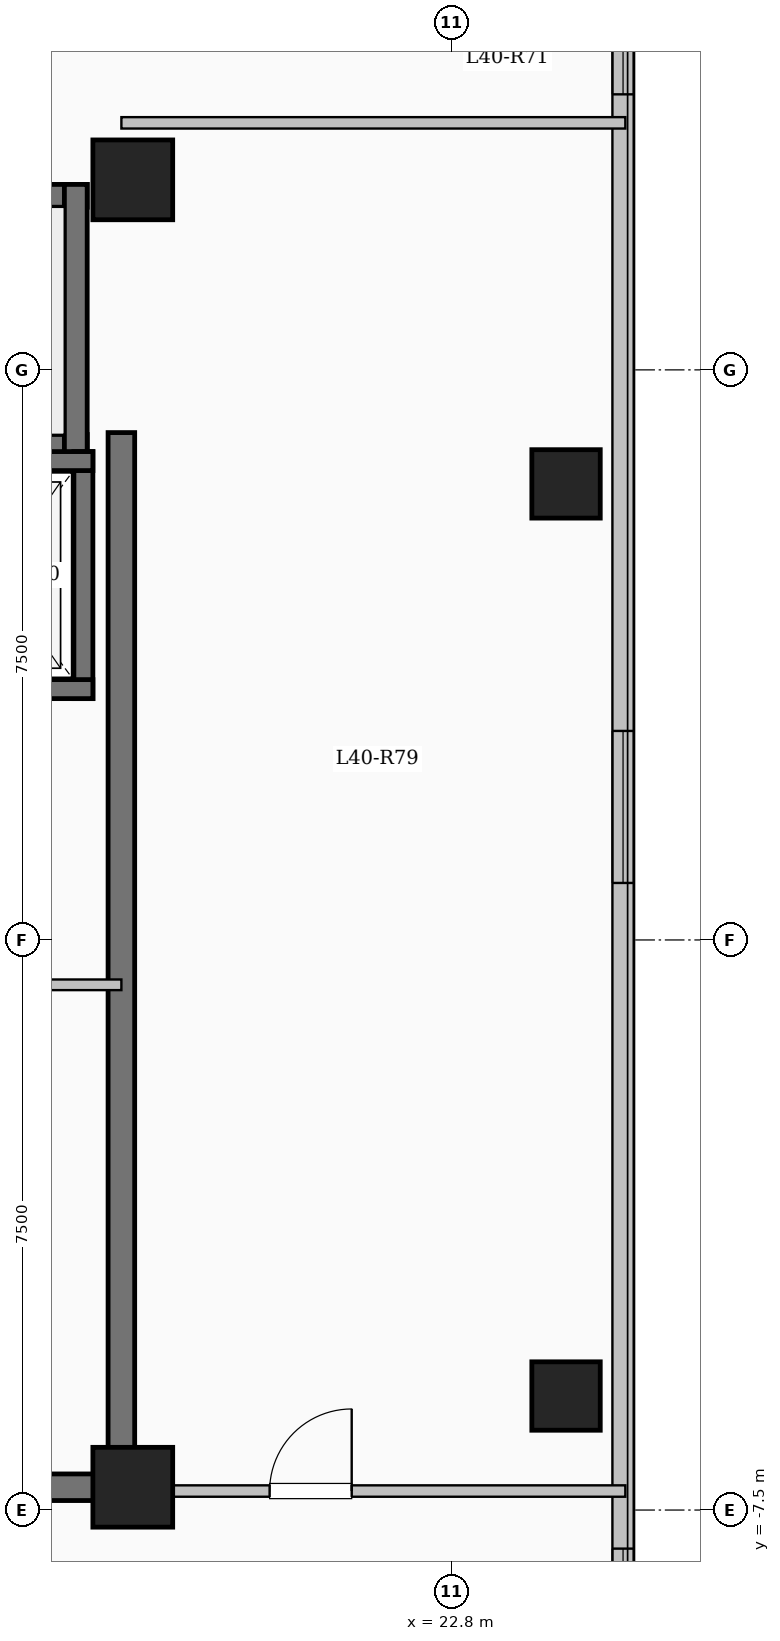
"""IFC4 building model, lengths in metres.
Left out: names, types, materials, properties, quantities, classifications, styles, units other than length and angle.
Written with IfcOpenShell. Run it as: python <this file> out.ifc"""

import sys

from ifc_helpers import new_model, si_unit, direction, frame, frame_2d, origin, origin_2d, place, context, subcontext, project, spatial, rectangle, extrude, element, fill, save


model = new_model("IFC4")
c1 = context("Model", 3, precision=1e-05, world=origin(), true_north=direction((0.0, 1.0)))
c2 = subcontext(c1, "Body", "Model", "MODEL_VIEW")
j1 = project(units=[si_unit("LENGTHUNIT", "METRE"), si_unit("PLANEANGLEUNIT", "RADIAN")], contexts=[c1])
p1 = place(None, origin())
s1 = spatial("IfcSite", under=j1, at=p1, CompositionType="ELEMENT")
p2 = place(p1, origin())
s2 = spatial("IfcBuilding", under=s1, at=p2, CompositionType="ELEMENT")
p3 = place(p2, frame((0.0, 0.0, 149.35)))
s3 = spatial("IfcBuildingStorey", under=s2, at=p3, CompositionType="ELEMENT", Elevation=149.35)
for number, where, z_axis, x_axis in (
    (1, (18.6, -7.2, 0.0), (0.0, 0.0, 1.0), (1.0, 0.0, 0.0)),
    (2, (18.6, 10.0, 0.0), (0.0, 0.0, 1.0), (1.0, 0.0, 0.0)),
):
    element("IfcColumn", number, at=place(p3, frame(where, z_axis=z_axis, x_axis=x_axis)), inside=s3, PredefinedType="COLUMN", context=c2, shape_type="SweptSolid", body=[
        extrude(rectangle(XDim=1.05, YDim=1.05, at=origin_2d()), origin(), (0.0, 0.0, 1.0), 3.35),
    ])
for number, where, z_axis, x_axis in (
    (3, (24.3, -6.0, 0.0), (0.0, 0.0, 1.0), (1.0, 0.0, 0.0)),
    (4, (24.3, 6.0, 0.0), (0.0, 0.0, 1.0), (1.0, 0.0, 0.0)),
):
    element("IfcColumn", number, at=place(p3, frame(where, z_axis=z_axis, x_axis=x_axis)), inside=s3, PredefinedType="COLUMN", context=c2, shape_type="SweptSolid", body=[
        extrude(rectangle(XDim=0.9, YDim=0.9, at=origin_2d()), origin(), (0.0, 0.0, 1.0), 3.35),
    ])
p4 = place(p3, frame((25.05, 17.25, 0.0), z_axis=(0.0, 0.0, 1.0), x_axis=(0.0, -1.0, 0.0)))
e5 = element("IfcWall", 5, at=p4, inside=s3, PredefinedType="SOLIDWALL", context=c2, shape_type="SweptSolid", body=[
    extrude(rectangle(XDim=34.5, YDim=0.28, at=frame_2d((17.25, 0.0))), origin(), (0.0, 0.0, 1.0), 3.1),
])
p5 = place(p4, frame((1.375, 0.0, 0.9)))
e6 = element("IfcOpeningElement", 6, at=p5, cuts=e5, PredefinedType="OPENING", context=c2, shape_type="SweptSolid", body=[
    extrude(rectangle(XDim=2.0, YDim=1.7, at=frame_2d((1.0, 0.85))), frame((0.0, 0.15, 0.0), z_axis=(0.0, -1.0, 0.0), x_axis=(1.0, 0.0, 0.0)), (0.0, 0.0, 1.0), 0.3),
])
p6 = place(p4, frame((5.125, 0.0, 0.95)))
e7 = element("IfcOpeningElement", 7, at=p6, cuts=e5, PredefinedType="OPENING", context=c2, shape_type="SweptSolid", body=[
    extrude(rectangle(XDim=1.0, YDim=1.5, at=frame_2d((0.5, 0.75))), frame((0.0, 0.15, 0.0), z_axis=(0.0, -1.0, 0.0), x_axis=(1.0, 0.0, 0.0)), (0.0, 0.0, 1.0), 0.3),
])
p7 = place(p4, frame((14.5, 0.0, 0.9)))
e8 = element("IfcOpeningElement", 8, at=p7, cuts=e5, PredefinedType="OPENING", context=c2, shape_type="SweptSolid", body=[
    extrude(rectangle(XDim=2.0, YDim=1.7, at=frame_2d((1.0, 0.85))), frame((0.0, 0.15, 0.0), z_axis=(0.0, -1.0, 0.0), x_axis=(1.0, 0.0, 0.0)), (0.0, 0.0, 1.0), 0.3),
])
p8 = place(p4, frame((25.258, 0.0, 0.9)))
e9 = element("IfcOpeningElement", 9, at=p8, cuts=e5, PredefinedType="OPENING", context=c2, shape_type="SweptSolid", body=[
    extrude(rectangle(XDim=1.5, YDim=1.65, at=frame_2d((0.75, 0.825))), frame((0.0, 0.15, 0.0), z_axis=(0.0, -1.0, 0.0), x_axis=(1.0, 0.0, 0.0)), (0.0, 0.0, 1.0), 0.3),
])
p9 = place(p4, frame((29.95, 0.0, 0.9)))
e10 = element("IfcOpeningElement", 10, at=p9, cuts=e5, PredefinedType="OPENING", context=c2, shape_type="SweptSolid", body=[
    extrude(rectangle(XDim=2.2, YDim=1.75, at=frame_2d((1.1, 0.875))), frame((0.0, 0.15, 0.0), z_axis=(0.0, -1.0, 0.0), x_axis=(1.0, 0.0, 0.0)), (0.0, 0.0, 1.0), 0.3),
])
p10 = place(p3, frame((10.0, 9.79, 0.0), z_axis=(0.0, 0.0, 1.0), x_axis=(1.0, 0.0, 0.0)))
e11 = element("IfcWall", 11, at=p10, inside=s3, PredefinedType="SHEAR", context=c2, shape_type="SweptSolid", body=[
    extrude(rectangle(XDim=8.0, YDim=0.3, at=frame_2d((4.0, 0.0))), origin(), (0.0, 0.0, 1.0), 3.35),
])
p11 = place(p3, frame((10.0, 6.5, 0.0), z_axis=(0.0, 0.0, 1.0), x_axis=(1.0, 0.0, 0.0)))
e12 = element("IfcWall", 12, at=p11, inside=s3, PredefinedType="SHEAR", context=c2, shape_type="SweptSolid", body=[
    extrude(rectangle(XDim=8.0, YDim=0.3, at=frame_2d((4.0, 0.0))), origin(), (0.0, 0.0, 1.0), 3.35),
])
p12 = place(p11, frame((0.55, 0.0, 0.0)))
e13 = element("IfcOpeningElement", 13, at=p12, cuts=e12, PredefinedType="OPENING", context=c2, shape_type="SweptSolid", body=[
    extrude(rectangle(XDim=1.0, YDim=2.15, at=frame_2d((0.5, 1.075))), frame((0.0, 0.16, 0.0), z_axis=(0.0, -1.0, 0.0), x_axis=(1.0, 0.0, 0.0)), (0.0, 0.0, 1.0), 0.32),
])
p13 = place(p3, frame((17.85, 6.35, 0.0), z_axis=(0.0, 0.0, 1.0), x_axis=(0.0, 1.0, 0.0)))
e14 = element("IfcWall", 14, at=p13, inside=s3, PredefinedType="SHEAR", context=c2, shape_type="SweptSolid", body=[
    extrude(rectangle(XDim=3.59, YDim=0.3, at=frame_2d((1.795, 0.0))), origin(), (0.0, 0.0, 1.0), 3.35),
])
p14 = place(p3, frame((17.95, 3.175, 0.0), z_axis=(0.0, 0.0, 1.0), x_axis=(0.0, 1.0, 0.0)))
e15 = element("IfcWall", 15, at=p14, inside=s3, PredefinedType="SHEAR", context=c2, shape_type="SweptSolid", body=[
    extrude(rectangle(XDim=3.25, YDim=0.25, at=frame_2d((1.625, 0.0))), origin(), (0.0, 0.0, 1.0), 3.35),
])
for number, where, z_axis, x_axis in (
    (16, (15.525, 3.3, 0.0), (0.0, 0.0, 1.0), (1.0, 0.0, 0.0)),
    (17, (15.525, 6.3, 0.0), (0.0, 0.0, 1.0), (1.0, 0.0, 0.0)),
):
    element("IfcWall", number, at=place(p3, frame(where, z_axis=z_axis, x_axis=x_axis)), inside=s3, PredefinedType="SHEAR", context=c2, shape_type="SweptSolid", body=[
        extrude(rectangle(XDim=2.55, YDim=0.25, at=frame_2d((1.275, 0.0))), origin(), (0.0, 0.0, 1.0), 3.35),
    ])
p15 = place(p3, frame((18.45, -7.375, 0.0), z_axis=(0.0, 0.0, 1.0), x_axis=(0.0, 1.0, 0.0)))
e18 = element("IfcWall", 18, at=p15, inside=s3, PredefinedType="SHEAR", context=c2, shape_type="SweptSolid", body=[
    extrude(rectangle(XDim=14.05, YDim=0.35, at=frame_2d((7.025, 0.0))), origin(), (0.0, 0.0, 1.0), 3.35),
])
p16 = place(p3, frame((10.075, -7.2, 0.0), z_axis=(0.0, 0.0, 1.0), x_axis=(1.0, 0.0, 0.0)))
e19 = element("IfcWall", 19, at=p16, inside=s3, PredefinedType="SHEAR", context=c2, shape_type="SweptSolid", body=[
    extrude(rectangle(XDim=8.55, YDim=0.35, at=frame_2d((4.275, 0.0))), origin(), (0.0, 0.0, 1.0), 3.35),
])
p17 = place(p3, frame((15.4, -0.59, 0.0), z_axis=(0.0, 0.0, 1.0), x_axis=(1.0, 0.0, 0.0)))
e20 = element("IfcWall", 20, at=p17, inside=s3, PredefinedType="PARTITIONING", context=c2, shape_type="SweptSolid", body=[
    extrude(rectangle(XDim=3.05, YDim=0.14, at=frame_2d((1.525, 0.0))), origin(), (0.0, 0.0, 1.0), 3.1),
])
p18 = place(p17, frame((1.05, 0.0, 0.0)))
e21 = element("IfcOpeningElement", 21, at=p18, cuts=e20, PredefinedType="OPENING", context=c2, shape_type="SweptSolid", body=[
    extrude(rectangle(XDim=0.9, YDim=2.08, at=frame_2d((0.45, 1.04))), frame((0.0, 0.08, 0.0), z_axis=(0.0, -1.0, 0.0), x_axis=(1.0, 0.0, 0.0)), (0.0, 0.0, 1.0), 0.16),
])
p19 = place(p3, frame((18.45, -7.25, 0.0), z_axis=(0.0, 0.0, 1.0), x_axis=(1.0, 0.0, 0.0)))
e22 = element("IfcWall", 22, at=p19, inside=s3, PredefinedType="PARTITIONING", context=c2, shape_type="SweptSolid", body=[
    extrude(rectangle(XDim=6.63, YDim=0.15, at=frame_2d((3.315, 0.0))), origin(), (0.0, 0.0, 1.0), 3.1),
])
p20 = place(p19, frame((1.95, 0.0, 0.0)))
e23 = element("IfcOpeningElement", 23, at=p20, cuts=e22, PredefinedType="OPENING", context=c2, shape_type="SweptSolid", body=[
    extrude(rectangle(XDim=1.08, YDim=2.15, at=frame_2d((0.54, 1.075))), frame((0.0, 0.085, 0.0), z_axis=(0.0, -1.0, 0.0), x_axis=(1.0, 0.0, 0.0)), (0.0, 0.0, 1.0), 0.17),
])
p21 = place(p3, frame((18.45, 10.75, 0.0), z_axis=(0.0, 0.0, 1.0), x_axis=(1.0, 0.0, 0.0)))
e24 = element("IfcWall", 24, at=p21, inside=s3, PredefinedType="PARTITIONING", context=c2, shape_type="SweptSolid", body=[
    extrude(rectangle(XDim=6.63, YDim=0.15, at=frame_2d((3.315, 0.0))), origin(), (0.0, 0.0, 1.0), 3.1),
])
p22 = place(p6, origin())
e25 = element("IfcWindow", 25, at=p22, inside=s3, PartitioningType="SINGLE_PANEL", PredefinedType="WINDOW", context=c2, shape_type="SweptSolid", body=[
    extrude(rectangle(XDim=1.0, YDim=1.5, at=frame_2d((0.5, 0.75))), frame((0.0, 0.03, 0.0), z_axis=(0.0, -1.0, 0.0), x_axis=(1.0, 0.0, 0.0)), (0.0, 0.0, 1.0), 0.06),
])
fill(e7, e25)
p23 = place(p7, origin())
e26 = element("IfcWindow", 26, at=p23, inside=s3, PartitioningType="SINGLE_PANEL", PredefinedType="WINDOW", context=c2, shape_type="SweptSolid", body=[
    extrude(rectangle(XDim=2.0, YDim=1.7, at=frame_2d((1.0, 0.85))), frame((0.0, 0.03, 0.0), z_axis=(0.0, -1.0, 0.0), x_axis=(1.0, 0.0, 0.0)), (0.0, 0.0, 1.0), 0.06),
])
fill(e8, e26)
p24 = place(p8, origin())
e27 = element("IfcWindow", 27, at=p24, inside=s3, PartitioningType="SINGLE_PANEL", PredefinedType="WINDOW", context=c2, shape_type="SweptSolid", body=[
    extrude(rectangle(XDim=1.5, YDim=1.65, at=frame_2d((0.75, 0.825))), frame((0.0, 0.03, 0.0), z_axis=(0.0, -1.0, 0.0), x_axis=(1.0, 0.0, 0.0)), (0.0, 0.0, 1.0), 0.06),
])
fill(e9, e27)
p25 = place(p20, origin())
e28 = element("IfcDoor", 28, at=p25, inside=s3, OperationType="SINGLE_SWING_RIGHT", PredefinedType="DOOR", context=c2, shape_type="SweptSolid", body=[
    extrude(rectangle(XDim=1.08, YDim=2.15, at=frame_2d((0.54, 1.075))), frame((0.0, 0.025, 0.0), z_axis=(0.0, -1.0, 0.0), x_axis=(1.0, 0.0, 0.0)), (0.0, 0.0, 1.0), 0.05),
])
fill(e23, e28)
save(model, sys.argv[1])
